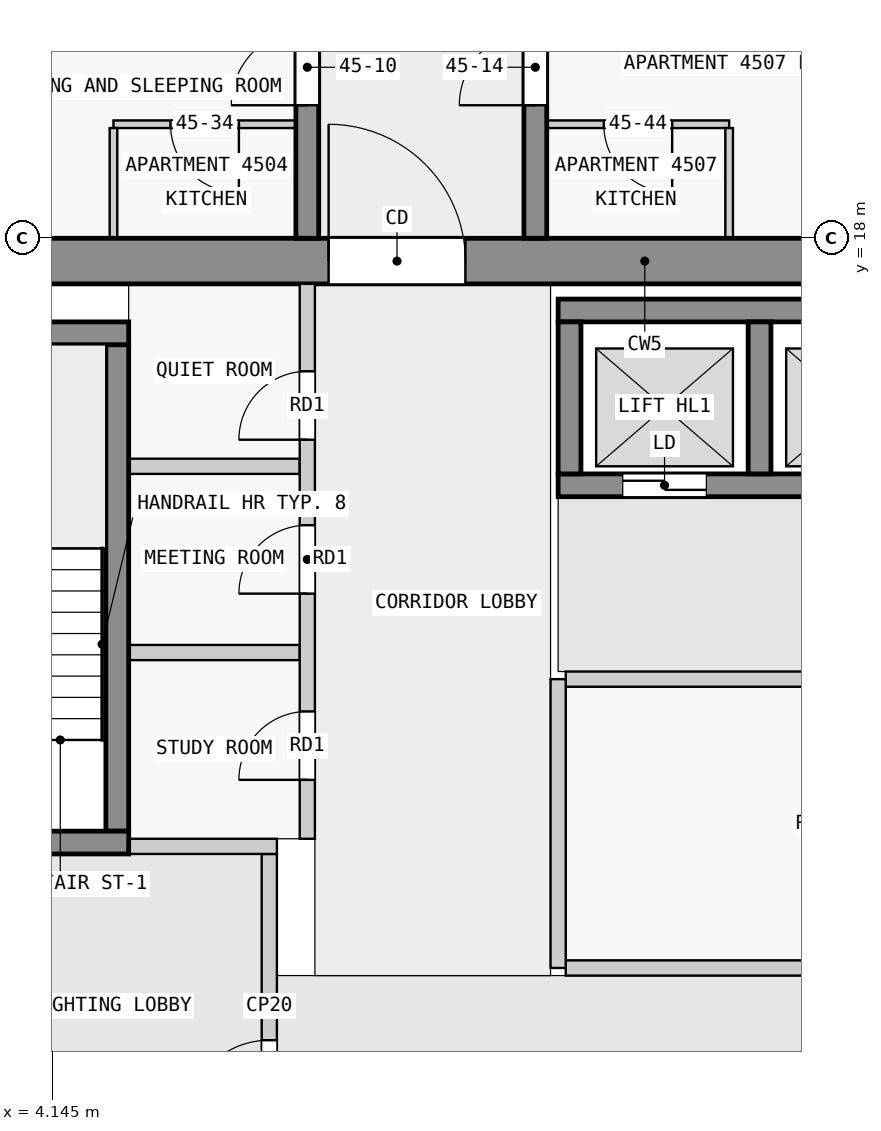
"""IFC4 building model, lengths in metres.
Left out: names, types, materials, properties, quantities, classifications, styles, units other than length and angle.
Written with IfcOpenShell. Run it as: python <this file> out.ifc"""

import sys

from ifc_helpers import new_model, si_unit, direction, frame, frame_2d, origin, place, context, subcontext, project, spatial, rectangle, extrude, element, fill, save


model = new_model("IFC4")
c1 = context("Model", 3, precision=1e-05, world=origin(), true_north=direction((0.0, 1.0)))
c2 = subcontext(c1, "Body", "Model", "MODEL_VIEW")
j1 = project(units=[si_unit("LENGTHUNIT", "METRE"), si_unit("PLANEANGLEUNIT", "RADIAN")], contexts=[c1])
p1 = place(None, origin())
s1 = spatial("IfcSite", under=j1, at=p1, CompositionType="ELEMENT")
p2 = place(p1, origin())
s2 = spatial("IfcBuilding", under=s1, at=p2, CompositionType="ELEMENT")
p3 = place(p2, frame((0.0, 0.0, 174.4)))
s3 = spatial("IfcBuildingStorey", under=s2, at=p3, CompositionType="ELEMENT", Elevation=174.4)
p4 = place(p3, frame((1.38, 17.7, 0.0), z_axis=(0.0, 0.0, 1.0), x_axis=(1.0, 0.0, 0.0)))
e1 = element("IfcWall", 1, at=p4, inside=s3, PredefinedType="SHEAR", context=c2, shape_type="SweptSolid", body=[
    extrude(rectangle(XDim=21.12, YDim=0.6, at=frame_2d((10.56, 0.0))), origin(), (0.0, 0.0, 1.0), 3.25),
])
p5 = place(p4, frame((6.4, 0.0, 0.0)))
e2 = element("IfcOpeningElement", 2, at=p5, cuts=e1, PredefinedType="OPENING", context=c2, shape_type="SweptSolid", body=[
    extrude(rectangle(XDim=1.8, YDim=2.1, at=frame_2d((0.9, 1.05))), frame((0.0, 0.31, 0.0), z_axis=(0.0, -1.0, 0.0), x_axis=(1.0, 0.0, 0.0)), (0.0, 0.0, 1.0), 0.62),
])
p6 = place(p3, frame((2.3, 10.05, 0.0), z_axis=(0.0, 0.0, 1.0), x_axis=(1.0, 0.0, 0.0)))
e3 = element("IfcWall", 3, at=p6, inside=s3, PredefinedType="SHEAR", context=c2, shape_type="SweptSolid", body=[
    extrude(rectangle(XDim=2.85, YDim=0.3, at=frame_2d((1.425, 0.0))), origin(), (0.0, 0.0, 1.0), 3.25),
])
p7 = place(p6, frame((0.25, 0.0, 0.0)))
e4 = element("IfcOpeningElement", 4, at=p7, cuts=e3, PredefinedType="OPENING", context=c2, shape_type="SweptSolid", body=[
    extrude(rectangle(XDim=1.1, YDim=2.1, at=frame_2d((0.55, 1.05))), frame((0.0, 0.16, 0.0), z_axis=(0.0, -1.0, 0.0), x_axis=(1.0, 0.0, 0.0)), (0.0, 0.0, 1.0), 0.32),
])
p8 = place(p3, frame((5.0, 10.2, 0.0), z_axis=(0.0, 0.0, 1.0), x_axis=(0.0, 1.0, 0.0)))
e5 = element("IfcWall", 5, at=p8, inside=s3, PredefinedType="SHEAR", context=c2, shape_type="SweptSolid", body=[
    extrude(rectangle(XDim=6.4, YDim=0.3, at=frame_2d((3.2, 0.0))), origin(), (0.0, 0.0, 1.0), 3.25),
])
p9 = place(p3, frame((2.3, 16.75, 0.0), z_axis=(0.0, 0.0, 1.0), x_axis=(1.0, 0.0, 0.0)))
e6 = element("IfcWall", 6, at=p9, inside=s3, PredefinedType="SHEAR", context=c2, shape_type="SweptSolid", body=[
    extrude(rectangle(XDim=2.85, YDim=0.3, at=frame_2d((1.425, 0.0))), origin(), (0.0, 0.0, 1.0), 3.25),
])
p10 = place(p3, frame((10.8, 17.05, 0.0), z_axis=(0.0, 0.0, 1.0), x_axis=(1.0, 0.0, 0.0)))
e7 = element("IfcWall", 7, at=p10, inside=s3, PredefinedType="SHEAR", context=c2, shape_type="SweptSolid", body=[
    extrude(rectangle(XDim=7.8, YDim=0.3, at=frame_2d((3.9, 0.0))), origin(), (0.0, 0.0, 1.0), 3.25),
])
p11 = place(p3, frame((10.8, 14.75, 0.0), z_axis=(0.0, 0.0, 1.0), x_axis=(1.0, 0.0, 0.0)))
e8 = element("IfcWall", 8, at=p11, inside=s3, PredefinedType="SHEAR", context=c2, shape_type="SweptSolid", body=[
    extrude(rectangle(XDim=7.8, YDim=0.3, at=frame_2d((3.9, 0.0))), origin(), (0.0, 0.0, 1.0), 3.25),
])
p12 = place(p11, frame((0.85, 0.0, 0.0)))
e9 = element("IfcOpeningElement", 9, at=p12, cuts=e8, PredefinedType="OPENING", context=c2, shape_type="SweptSolid", body=[
    extrude(rectangle(XDim=1.1, YDim=2.1, at=frame_2d((0.55, 1.05))), frame((0.0, 0.16, 0.0), z_axis=(0.0, -1.0, 0.0), x_axis=(1.0, 0.0, 0.0)), (0.0, 0.0, 1.0), 0.32),
])
p13 = place(p11, frame((3.35, 0.0, 0.0)))
e10 = element("IfcOpeningElement", 10, at=p13, cuts=e8, PredefinedType="OPENING", context=c2, shape_type="SweptSolid", body=[
    extrude(rectangle(XDim=1.1, YDim=2.1, at=frame_2d((0.55, 1.05))), frame((0.0, 0.16, 0.0), z_axis=(0.0, -1.0, 0.0), x_axis=(1.0, 0.0, 0.0)), (0.0, 0.0, 1.0), 0.32),
])
p14 = place(p11, frame((5.85, 0.0, 0.0)))
e11 = element("IfcOpeningElement", 11, at=p14, cuts=e8, PredefinedType="OPENING", context=c2, shape_type="SweptSolid", body=[
    extrude(rectangle(XDim=1.1, YDim=2.1, at=frame_2d((0.55, 1.05))), frame((0.0, 0.16, 0.0), z_axis=(0.0, -1.0, 0.0), x_axis=(1.0, 0.0, 0.0)), (0.0, 0.0, 1.0), 0.32),
])
for number, where, z_axis, x_axis in (
    (12, (10.95, 14.9, 0.0), (0.0, 0.0, 1.0), (0.0, 1.0, 0.0)),
    (13, (13.45, 14.9, 0.0), (0.0, 0.0, 1.0), (0.0, 1.0, 0.0)),
):
    element("IfcWall", number, at=place(p3, frame(where, z_axis=z_axis, x_axis=x_axis)), inside=s3, PredefinedType="SHEAR", context=c2, shape_type="SweptSolid", body=[
        extrude(rectangle(XDim=2.0, YDim=0.3, at=frame_2d((1.0, 0.0))), origin(), (0.0, 0.0, 1.0), 3.25),
    ])
p15 = place(p3, frame((7.5, 18.0, 0.0), z_axis=(0.0, 0.0, 1.0), x_axis=(0.0, 1.0, 0.0)))
e14 = element("IfcWall", 14, at=p15, inside=s3, PredefinedType="SHEAR", context=c2, shape_type="SweptSolid", body=[
    extrude(rectangle(XDim=27.0, YDim=0.3, at=frame_2d((13.5, 0.0))), origin(), (0.0, 0.0, 1.0), 3.25),
])
p16 = place(p15, frame((1.75, 0.0, 0.0)))
e15 = element("IfcOpeningElement", 15, at=p16, cuts=e14, PredefinedType="OPENING", context=c2, shape_type="SweptSolid", body=[
    extrude(rectangle(XDim=1.0, YDim=2.1, at=frame_2d((0.5, 1.05))), frame((0.0, 0.16, 0.0), z_axis=(0.0, -1.0, 0.0), x_axis=(1.0, 0.0, 0.0)), (0.0, 0.0, 1.0), 0.32),
])
p17 = place(p15, frame((5.85, 0.0, 0.0)))
e16 = element("IfcOpeningElement", 16, at=p17, cuts=e14, PredefinedType="OPENING", context=c2, shape_type="SweptSolid", body=[
    extrude(rectangle(XDim=1.8, YDim=2.1, at=frame_2d((0.9, 1.05))), frame((0.0, 0.16, 0.0), z_axis=(0.0, -1.0, 0.0), x_axis=(1.0, 0.0, 0.0)), (0.0, 0.0, 1.0), 0.32),
])
p18 = place(p15, frame((13.05, 0.0, 0.0)))
e17 = element("IfcOpeningElement", 17, at=p18, cuts=e14, PredefinedType="OPENING", context=c2, shape_type="SweptSolid", body=[
    extrude(rectangle(XDim=1.0, YDim=2.1, at=frame_2d((0.5, 1.05))), frame((0.0, 0.16, 0.0), z_axis=(0.0, -1.0, 0.0), x_axis=(1.0, 0.0, 0.0)), (0.0, 0.0, 1.0), 0.32),
])
p19 = place(p15, frame((21.35, 0.0, 0.0)))
e18 = element("IfcOpeningElement", 18, at=p19, cuts=e14, PredefinedType="OPENING", context=c2, shape_type="SweptSolid", body=[
    extrude(rectangle(XDim=1.0, YDim=2.1, at=frame_2d((0.5, 1.05))), frame((0.0, 0.16, 0.0), z_axis=(0.0, -1.0, 0.0), x_axis=(1.0, 0.0, 0.0)), (0.0, 0.0, 1.0), 0.32),
])
p20 = place(p3, frame((10.5, 18.0, 0.0), z_axis=(0.0, 0.0, 1.0), x_axis=(0.0, 1.0, 0.0)))
e19 = element("IfcWall", 19, at=p20, inside=s3, PredefinedType="SHEAR", context=c2, shape_type="SweptSolid", body=[
    extrude(rectangle(XDim=27.0, YDim=0.3, at=frame_2d((13.5, 0.0))), origin(), (0.0, 0.0, 1.0), 3.25),
])
p21 = place(p20, frame((1.75, 0.0, 0.0)))
e20 = element("IfcOpeningElement", 20, at=p21, cuts=e19, PredefinedType="OPENING", context=c2, shape_type="SweptSolid", body=[
    extrude(rectangle(XDim=1.0, YDim=2.1, at=frame_2d((0.5, 1.05))), frame((0.0, 0.16, 0.0), z_axis=(0.0, -1.0, 0.0), x_axis=(1.0, 0.0, 0.0)), (0.0, 0.0, 1.0), 0.32),
])
p22 = place(p20, frame((6.25, 0.0, 0.0)))
e21 = element("IfcOpeningElement", 21, at=p22, cuts=e19, PredefinedType="OPENING", context=c2, shape_type="SweptSolid", body=[
    extrude(rectangle(XDim=1.0, YDim=2.1, at=frame_2d((0.5, 1.05))), frame((0.0, 0.16, 0.0), z_axis=(0.0, -1.0, 0.0), x_axis=(1.0, 0.0, 0.0)), (0.0, 0.0, 1.0), 0.32),
])
p23 = place(p20, frame((10.75, 0.0, 0.0)))
e22 = element("IfcOpeningElement", 22, at=p23, cuts=e19, PredefinedType="OPENING", context=c2, shape_type="SweptSolid", body=[
    extrude(rectangle(XDim=1.0, YDim=2.1, at=frame_2d((0.5, 1.05))), frame((0.0, 0.16, 0.0), z_axis=(0.0, -1.0, 0.0), x_axis=(1.0, 0.0, 0.0)), (0.0, 0.0, 1.0), 0.32),
])
p24 = place(p20, frame((15.25, 0.0, 0.0)))
e23 = element("IfcOpeningElement", 23, at=p24, cuts=e19, PredefinedType="OPENING", context=c2, shape_type="SweptSolid", body=[
    extrude(rectangle(XDim=1.0, YDim=2.1, at=frame_2d((0.5, 1.05))), frame((0.0, 0.16, 0.0), z_axis=(0.0, -1.0, 0.0), x_axis=(1.0, 0.0, 0.0)), (0.0, 0.0, 1.0), 0.32),
])
p25 = place(p20, frame((19.75, 0.0, 0.0)))
e24 = element("IfcOpeningElement", 24, at=p25, cuts=e19, PredefinedType="OPENING", context=c2, shape_type="SweptSolid", body=[
    extrude(rectangle(XDim=1.0, YDim=2.1, at=frame_2d((0.5, 1.05))), frame((0.0, 0.16, 0.0), z_axis=(0.0, -1.0, 0.0), x_axis=(1.0, 0.0, 0.0)), (0.0, 0.0, 1.0), 0.32),
])
p26 = place(p20, frame((23.25, 0.0, 0.0)))
e25 = element("IfcOpeningElement", 25, at=p26, cuts=e19, PredefinedType="OPENING", context=c2, shape_type="SweptSolid", body=[
    extrude(rectangle(XDim=0.9, YDim=2.1, at=frame_2d((0.45, 1.05))), frame((0.0, 0.16, 0.0), z_axis=(0.0, -1.0, 0.0), x_axis=(1.0, 0.0, 0.0)), (0.0, 0.0, 1.0), 0.32),
])
p27 = place(p20, frame((25.45, 0.0, 0.0)))
e26 = element("IfcOpeningElement", 26, at=p27, cuts=e19, PredefinedType="OPENING", context=c2, shape_type="SweptSolid", body=[
    extrude(rectangle(XDim=1.0, YDim=2.1, at=frame_2d((0.5, 1.05))), frame((0.0, 0.16, 0.0), z_axis=(0.0, -1.0, 0.0), x_axis=(1.0, 0.0, 0.0)), (0.0, 0.0, 1.0), 0.32),
])
p28 = place(p3, frame((7.0, 5.9, 0.0), z_axis=(0.0, 0.0, 1.0), x_axis=(0.0, 1.0, 0.0)))
e27 = element("IfcWall", 27, at=p28, inside=s3, PredefinedType="PARTITIONING", context=c2, shape_type="SweptSolid", body=[
    extrude(rectangle(XDim=4.0, YDim=0.2, at=frame_2d((2.0, 0.0))), origin(), (0.0, 0.0, 1.0), 3.25),
])
p29 = place(p28, frame((0.45, 0.0, 0.0)))
e28 = element("IfcOpeningElement", 28, at=p29, cuts=e27, PredefinedType="OPENING", context=c2, shape_type="SweptSolid", body=[
    extrude(rectangle(XDim=1.1, YDim=2.1, at=frame_2d((0.55, 1.05))), frame((0.0, 0.11, 0.0), z_axis=(0.0, -1.0, 0.0), x_axis=(1.0, 0.0, 0.0)), (0.0, 0.0, 1.0), 0.22),
])
p30 = place(p3, frame((5.15, 10.0, 0.0), z_axis=(0.0, 0.0, 1.0), x_axis=(1.0, 0.0, 0.0)))
e29 = element("IfcWall", 29, at=p30, inside=s3, PredefinedType="PARTITIONING", context=c2, shape_type="SweptSolid", body=[
    extrude(rectangle(XDim=1.95, YDim=0.2, at=frame_2d((0.975, 0.0))), origin(), (0.0, 0.0, 1.0), 3.25),
])
p31 = place(p3, frame((10.8, 8.4, 0.0), z_axis=(0.0, 0.0, 1.0), x_axis=(0.0, 1.0, 0.0)))
e30 = element("IfcWall", 30, at=p31, inside=s3, PredefinedType="PARTITIONING", context=c2, shape_type="SweptSolid", body=[
    extrude(rectangle(XDim=3.8, YDim=0.2, at=frame_2d((1.9, 0.0))), origin(), (0.0, 0.0, 1.0), 3.25),
])
p32 = place(p3, frame((10.9, 8.4, 0.0), z_axis=(0.0, 0.0, 1.0), x_axis=(1.0, 0.0, 0.0)))
e31 = element("IfcWall", 31, at=p32, inside=s3, PredefinedType="PARTITIONING", context=c2, shape_type="SweptSolid", body=[
    extrude(rectangle(XDim=8.5, YDim=0.2, at=frame_2d((4.25, 0.0))), origin(), (0.0, 0.0, 1.0), 3.25),
])
p33 = place(p3, frame((10.9, 12.2, 0.0), z_axis=(0.0, 0.0, 1.0), x_axis=(1.0, 0.0, 0.0)))
e32 = element("IfcWall", 32, at=p33, inside=s3, PredefinedType="PARTITIONING", context=c2, shape_type="SweptSolid", body=[
    extrude(rectangle(XDim=8.5, YDim=0.2, at=frame_2d((4.25, 0.0))), origin(), (0.0, 0.0, 1.0), 3.25),
])
p34 = place(p33, frame((3.8, 0.0, 0.0)))
e33 = element("IfcOpeningElement", 33, at=p34, cuts=e32, PredefinedType="OPENING", context=c2, shape_type="SweptSolid", body=[
    extrude(rectangle(XDim=0.9, YDim=2.1, at=frame_2d((0.45, 1.05))), frame((0.0, 0.11, 0.0), z_axis=(0.0, -1.0, 0.0), x_axis=(1.0, 0.0, 0.0)), (0.0, 0.0, 1.0), 0.22),
])
p35 = place(p3, frame((7.5, 10.1, 0.0), z_axis=(0.0, 0.0, 1.0), x_axis=(0.0, 1.0, 0.0)))
e34 = element("IfcWall", 34, at=p35, inside=s3, PredefinedType="PARTITIONING", context=c2, shape_type="SweptSolid", body=[
    extrude(rectangle(XDim=7.3, YDim=0.2, at=frame_2d((3.65, 0.0))), origin(), (0.0, 0.0, 1.0), 3.25),
])
p36 = place(p35, frame((0.775, 0.0, 0.0)))
e35 = element("IfcOpeningElement", 35, at=p36, cuts=e34, PredefinedType="OPENING", context=c2, shape_type="SweptSolid", body=[
    extrude(rectangle(XDim=0.9, YDim=2.1, at=frame_2d((0.45, 1.05))), frame((0.0, 0.11, 0.0), z_axis=(0.0, -1.0, 0.0), x_axis=(1.0, 0.0, 0.0)), (0.0, 0.0, 1.0), 0.22),
])
p37 = place(p35, frame((3.225, 0.0, 0.0)))
e36 = element("IfcOpeningElement", 36, at=p37, cuts=e34, PredefinedType="OPENING", context=c2, shape_type="SweptSolid", body=[
    extrude(rectangle(XDim=0.9, YDim=2.1, at=frame_2d((0.45, 1.05))), frame((0.0, 0.11, 0.0), z_axis=(0.0, -1.0, 0.0), x_axis=(1.0, 0.0, 0.0)), (0.0, 0.0, 1.0), 0.22),
])
p38 = place(p35, frame((5.25, 0.0, 0.0)))
e37 = element("IfcOpeningElement", 37, at=p38, cuts=e34, PredefinedType="OPENING", context=c2, shape_type="SweptSolid", body=[
    extrude(rectangle(XDim=0.9, YDim=2.1, at=frame_2d((0.45, 1.05))), frame((0.0, 0.11, 0.0), z_axis=(0.0, -1.0, 0.0), x_axis=(1.0, 0.0, 0.0)), (0.0, 0.0, 1.0), 0.22),
])
for number, where, z_axis, x_axis in (
    (38, (5.15, 12.55, 0.0), (0.0, 0.0, 1.0), (1.0, 0.0, 0.0)),
    (39, (5.15, 15.0, 0.0), (0.0, 0.0, 1.0), (1.0, 0.0, 0.0)),
):
    element("IfcWall", number, at=place(p3, frame(where, z_axis=z_axis, x_axis=x_axis)), inside=s3, PredefinedType="PARTITIONING", context=c2, shape_type="SweptSolid", body=[
        extrude(rectangle(XDim=2.25, YDim=0.2, at=frame_2d((1.125, 0.0))), origin(), (0.0, 0.0, 1.0), 3.25),
    ])
p39 = place(p3, frame((7.35, 19.5, 0.0), z_axis=(0.0, 0.0, 1.0), x_axis=(-1.0, 0.0, 0.0)))
e40 = element("IfcWall", 40, at=p39, inside=s3, PredefinedType="PARTITIONING", context=c2, shape_type="SweptSolid", body=[
    extrude(rectangle(XDim=2.4, YDim=0.1, at=frame_2d((1.2, 0.0))), origin(), (0.0, 0.0, 1.0), 3.25),
])
p40 = place(p39, frame((0.75, 0.0, 0.0)))
e41 = element("IfcOpeningElement", 41, at=p40, cuts=e40, PredefinedType="OPENING", context=c2, shape_type="SweptSolid", body=[
    extrude(rectangle(XDim=0.9, YDim=2.1, at=frame_2d((0.45, 1.05))), frame((0.0, 0.06, 0.0), z_axis=(0.0, -1.0, 0.0), x_axis=(1.0, 0.0, 0.0)), (0.0, 0.0, 1.0), 0.12),
])
p41 = place(p3, frame((13.05, 19.5, 0.0), z_axis=(0.0, 0.0, 1.0), x_axis=(-1.0, 0.0, 0.0)))
e42 = element("IfcWall", 42, at=p41, inside=s3, PredefinedType="PARTITIONING", context=c2, shape_type="SweptSolid", body=[
    extrude(rectangle(XDim=2.4, YDim=0.1, at=frame_2d((1.2, 0.0))), origin(), (0.0, 0.0, 1.0), 3.25),
])
p42 = place(p41, frame((0.75, 0.0, 0.0)))
e43 = element("IfcOpeningElement", 43, at=p42, cuts=e42, PredefinedType="OPENING", context=c2, shape_type="SweptSolid", body=[
    extrude(rectangle(XDim=0.9, YDim=2.1, at=frame_2d((0.45, 1.05))), frame((0.0, 0.06, 0.0), z_axis=(0.0, -1.0, 0.0), x_axis=(1.0, 0.0, 0.0)), (0.0, 0.0, 1.0), 0.12),
])
for number, where, z_axis, x_axis in (
    (44, (4.95, 19.45, 0.0), (0.0, 0.0, 1.0), (0.0, -1.0, 0.0)),
    (45, (13.05, 18.0, 0.0), (0.0, 0.0, 1.0), (0.0, 1.0, 0.0)),
):
    element("IfcWall", number, at=place(p3, frame(where, z_axis=z_axis, x_axis=x_axis)), inside=s3, PredefinedType="PARTITIONING", context=c2, shape_type="SweptSolid", body=[
        extrude(rectangle(XDim=1.45, YDim=0.1, at=frame_2d((0.725, 0.0))), origin(), (0.0, 0.0, 1.0), 3.25),
    ])
p43 = place(p29, origin())
e46 = element("IfcDoor", 46, at=p43, inside=s3, OperationType="SINGLE_SWING_LEFT", PredefinedType="DOOR", context=c2, shape_type="SweptSolid", body=[
    extrude(rectangle(XDim=1.1, YDim=2.1, at=frame_2d((0.55, 1.05))), frame((0.0, 0.025, 0.0), z_axis=(0.0, -1.0, 0.0), x_axis=(1.0, 0.0, 0.0)), (0.0, 0.0, 1.0), 0.05),
])
fill(e28, e46)
p44 = place(p12, origin())
e47 = element("IfcDoor", 47, at=p44, inside=s3, OperationType="DOUBLE_DOOR_SLIDING", PredefinedType="DOOR", context=c2, shape_type="SweptSolid", body=[
    extrude(rectangle(XDim=1.1, YDim=2.1, at=frame_2d((0.55, 1.05))), frame((0.0, 0.025, 0.0), z_axis=(0.0, -1.0, 0.0), x_axis=(1.0, 0.0, 0.0)), (0.0, 0.0, 1.0), 0.05),
])
fill(e9, e47)
p45 = place(p5, origin())
e48 = element("IfcDoor", 48, at=p45, inside=s3, OperationType="DOUBLE_DOOR_SINGLE_SWING", PredefinedType="DOOR", context=c2, shape_type="SweptSolid", body=[
    extrude(rectangle(XDim=1.8, YDim=2.1, at=frame_2d((0.9, 1.05))), frame((0.0, 0.025, 0.0), z_axis=(0.0, -1.0, 0.0), x_axis=(1.0, 0.0, 0.0)), (0.0, 0.0, 1.0), 0.05),
])
fill(e2, e48)
p46 = place(p36, origin())
e49 = element("IfcDoor", 49, at=p46, inside=s3, OperationType="SINGLE_SWING_RIGHT", PredefinedType="DOOR", context=c2, shape_type="SweptSolid", body=[
    extrude(rectangle(XDim=0.9, YDim=2.1, at=frame_2d((0.45, 1.05))), frame((0.0, 0.025, 0.0), z_axis=(0.0, -1.0, 0.0), x_axis=(1.0, 0.0, 0.0)), (0.0, 0.0, 1.0), 0.05),
])
fill(e35, e49)
p47 = place(p37, origin())
e50 = element("IfcDoor", 50, at=p47, inside=s3, OperationType="SINGLE_SWING_RIGHT", PredefinedType="DOOR", context=c2, shape_type="SweptSolid", body=[
    extrude(rectangle(XDim=0.9, YDim=2.1, at=frame_2d((0.45, 1.05))), frame((0.0, 0.025, 0.0), z_axis=(0.0, -1.0, 0.0), x_axis=(1.0, 0.0, 0.0)), (0.0, 0.0, 1.0), 0.05),
])
fill(e36, e50)
p48 = place(p38, origin())
e51 = element("IfcDoor", 51, at=p48, inside=s3, OperationType="SINGLE_SWING_RIGHT", PredefinedType="DOOR", context=c2, shape_type="SweptSolid", body=[
    extrude(rectangle(XDim=0.9, YDim=2.1, at=frame_2d((0.45, 1.05))), frame((0.0, 0.025, 0.0), z_axis=(0.0, -1.0, 0.0), x_axis=(1.0, 0.0, 0.0)), (0.0, 0.0, 1.0), 0.05),
])
fill(e37, e51)
p49 = place(p16, origin())
e52 = element("IfcDoor", 52, at=p49, inside=s3, OperationType="SINGLE_SWING_LEFT", PredefinedType="DOOR", context=c2, shape_type="SweptSolid", body=[
    extrude(rectangle(XDim=1.0, YDim=2.1, at=frame_2d((0.5, 1.05))), frame((0.0, 0.025, 0.0), z_axis=(0.0, -1.0, 0.0), x_axis=(1.0, 0.0, 0.0)), (0.0, 0.0, 1.0), 0.05),
])
fill(e15, e52)
p50 = place(p21, origin())
e53 = element("IfcDoor", 53, at=p50, inside=s3, OperationType="SINGLE_SWING_LEFT", PredefinedType="DOOR", context=c2, shape_type="SweptSolid", body=[
    extrude(rectangle(XDim=1.0, YDim=2.1, at=frame_2d((0.5, 1.05))), frame((0.0, 0.025, 0.0), z_axis=(0.0, -1.0, 0.0), x_axis=(1.0, 0.0, 0.0)), (0.0, 0.0, 1.0), 0.05),
])
fill(e20, e53)
p51 = place(p40, origin())
e54 = element("IfcDoor", 54, at=p51, inside=s3, OperationType="SINGLE_SWING_RIGHT", PredefinedType="DOOR", context=c2, shape_type="SweptSolid", body=[
    extrude(rectangle(XDim=0.9, YDim=2.1, at=frame_2d((0.45, 1.05))), frame((0.0, 0.025, 0.0), z_axis=(0.0, -1.0, 0.0), x_axis=(1.0, 0.0, 0.0)), (0.0, 0.0, 1.0), 0.05),
])
fill(e41, e54)
p52 = place(p42, origin())
e55 = element("IfcDoor", 55, at=p52, inside=s3, OperationType="SINGLE_SWING_LEFT", PredefinedType="DOOR", context=c2, shape_type="SweptSolid", body=[
    extrude(rectangle(XDim=0.9, YDim=2.1, at=frame_2d((0.45, 1.05))), frame((0.0, 0.025, 0.0), z_axis=(0.0, -1.0, 0.0), x_axis=(1.0, 0.0, 0.0)), (0.0, 0.0, 1.0), 0.05),
])
fill(e43, e55)
save(model, sys.argv[1])
